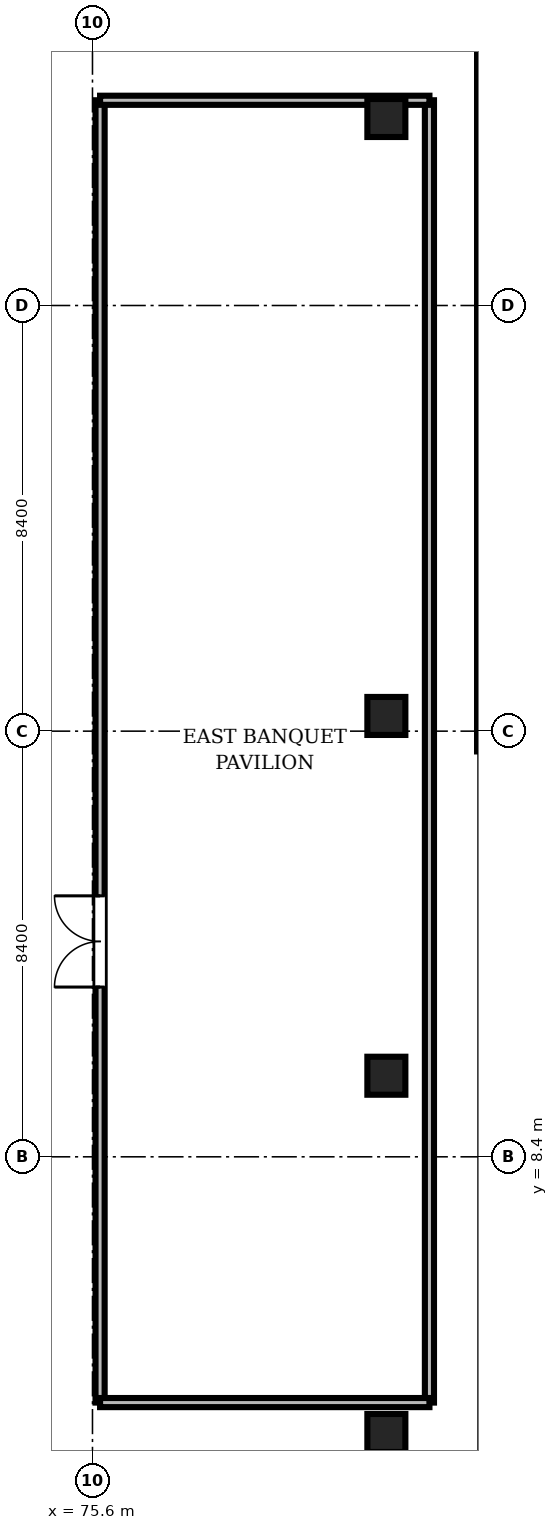
"""IFC4 building model, lengths in metres.
Left out: names, types, materials, properties, quantities, classifications, styles, units other than length and angle.
Written with IfcOpenShell. Run it as: python <this file> out.ifc"""

import sys

from ifc_helpers import new_model, si_unit, direction, frame, frame_2d, origin, origin_2d, place, context, subcontext, project, spatial, rectangle, extrude, source, transform, mapped, element, fill, save


model = new_model("IFC4")
c1 = context("Model", 3, precision=1e-05, world=origin(), true_north=direction((0.0, 1.0)))
c2 = subcontext(c1, "Body", "Model", "MODEL_VIEW")
j1 = project(units=[si_unit("LENGTHUNIT", "METRE"), si_unit("PLANEANGLEUNIT", "RADIAN")], contexts=[c1])
p1 = place(None, origin())
s1 = spatial("IfcSite", under=j1, at=p1, CompositionType="ELEMENT")
p2 = place(p1, origin())
s2 = spatial("IfcBuilding", under=s1, at=p2, CompositionType="ELEMENT")
p3 = place(p2, frame((0.0, 0.0, 17.0)))
s3 = spatial("IfcBuildingStorey", under=s2, at=p3, CompositionType="ELEMENT", Elevation=17.0)
m1 = source(origin(), c2, "Body", "SweptSolid", [
    extrude(rectangle(XDim=0.75, YDim=0.75, at=origin_2d()), origin(), (0.0, 0.0, 1.0), 5.08),
])
for number, where, z_axis, x_axis in (
    (1, (81.4, 2.95, 0.0), (0.0, 0.0, 1.0), (1.0, 0.0, 0.0)),
    (2, (81.4, 10.0, 0.0), (0.0, 0.0, 1.0), (1.0, 0.0, 0.0)),
    (3, (81.4, 17.1, 0.0), (0.0, 0.0, 1.0), (1.0, 0.0, 0.0)),
    (4, (81.4, 28.9, 0.0), (0.0, 0.0, 1.0), (1.0, 0.0, 0.0)),
):
    element("IfcColumn", number, at=place(p3, frame(where, z_axis=z_axis, x_axis=x_axis)), inside=s3, PredefinedType="COLUMN", context=c2, shape_type="MappedRepresentation", body=[
        mapped(m1, transform((0.0, 0.0, 0.0), scale=1.0)),
    ])
m2 = source(origin(), c2, "Body", "SweptSolid", [
    extrude(rectangle(XDim=23.4, YDim=0.32, at=frame_2d((11.7, 0.0))), origin(), (0.0, 0.0, 1.0), 5.08),
])
p4 = place(p3, frame((83.35, 16.4, 0.0), z_axis=(0.0, 0.0, 1.0), x_axis=(0.0, 1.0, 0.0)))
e5 = element("IfcWall", 5, at=p4, inside=s3, PredefinedType="SOLIDWALL", context=c2, shape_type="MappedRepresentation", body=[
    mapped(m2, transform((0.0, 0.0, 0.0), scale=1.0)),
])
m3 = source(origin(), c2, "Body", "SweptSolid", [
    extrude(rectangle(XDim=2.6, YDim=2.8, at=frame_2d((1.3, 1.4))), frame((0.0, 0.17, 0.0), z_axis=(0.0, -1.0, 0.0), x_axis=(1.0, 0.0, 0.0)), (0.0, 0.0, 1.0), 0.34),
])
p5 = place(p4, frame((2.4, 0.0, 0.85)))
e6 = element("IfcOpeningElement", 6, at=p5, cuts=e5, PredefinedType="OPENING", context=c2, shape_type="MappedRepresentation", body=[
    mapped(m3, transform((0.0, 0.0, 0.0), scale=1.0)),
])
p6 = place(p4, frame((11.2, 0.0, 0.85)))
e7 = element("IfcOpeningElement", 7, at=p6, cuts=e5, PredefinedType="OPENING", context=c2, shape_type="MappedRepresentation", body=[
    mapped(m3, transform((0.0, 0.0, 0.0), scale=1.0)),
])
m4 = source(origin(), c2, "Body", "SweptSolid", [
    extrude(rectangle(XDim=25.7, YDim=0.18, at=frame_2d((12.85, 0.0))), origin(), (0.0, 0.0, 1.0), 4.548),
])
p7 = place(p3, frame((75.75, 3.55, 0.0), z_axis=(0.0, 0.0, 1.0), x_axis=(0.0, 1.0, 0.0)))
e8 = element("IfcWall", 8, at=p7, inside=s3, PredefinedType="PARTITIONING", context=c2, shape_type="MappedRepresentation", body=[
    mapped(m4, transform((0.0, 0.0, 0.0), scale=1.0)),
])
m5 = source(origin(), c2, "Body", "SweptSolid", [
    extrude(rectangle(XDim=1.8, YDim=2.4, at=frame_2d((0.9, 1.2))), frame((0.0, 0.1, 0.0), z_axis=(0.0, -1.0, 0.0), x_axis=(1.0, 0.0, 0.0)), (0.0, 0.0, 1.0), 0.2),
])
p8 = place(p7, frame((8.2, 0.0, 0.0)))
e9 = element("IfcOpeningElement", 9, at=p8, cuts=e8, PredefinedType="OPENING", context=c2, shape_type="MappedRepresentation", body=[
    mapped(m5, transform((0.0, 0.0, 0.0), scale=1.0)),
])
m6 = source(origin(), c2, "Body", "SweptSolid", [
    extrude(rectangle(XDim=25.7, YDim=0.18, at=frame_2d((12.85, 0.0))), origin(), (0.0, 0.0, 1.0), 5.08),
])
p9 = place(p3, frame((82.25, 3.55, 0.0), z_axis=(0.0, 0.0, 1.0), x_axis=(0.0, 1.0, 0.0)))
e10 = element("IfcWall", 10, at=p9, inside=s3, PredefinedType="PARTITIONING", context=c2, shape_type="MappedRepresentation", body=[
    mapped(m6, transform((0.0, 0.0, 0.0), scale=1.0)),
])
m7 = source(origin(), c2, "Body", "SweptSolid", [
    extrude(rectangle(XDim=6.5, YDim=0.18, at=frame_2d((3.25, 0.0))), origin(), (0.0, 0.0, 1.0), 4.472),
])
for number, where, z_axis, x_axis in (
    (11, (75.75, 3.55, 0.0), (0.0, 0.0, 1.0), (1.0, 0.0, 0.0)),
    (12, (75.75, 29.25, 0.0), (0.0, 0.0, 1.0), (1.0, 0.0, 0.0)),
):
    element("IfcWall", number, at=place(p3, frame(where, z_axis=z_axis, x_axis=x_axis)), inside=s3, PredefinedType="PARTITIONING", context=c2, shape_type="MappedRepresentation", body=[
        mapped(m7, transform((0.0, 0.0, 0.0), scale=1.0)),
    ])
m8 = source(origin(), c2, "Body", "SweptSolid", [
    extrude(rectangle(XDim=1.8, YDim=2.4, at=frame_2d((0.9, 1.2))), frame((0.0, 0.025, 0.0), z_axis=(0.0, -1.0, 0.0), x_axis=(1.0, 0.0, 0.0)), (0.0, 0.0, 1.0), 0.05),
])
p10 = place(p8, origin())
e13 = element("IfcDoor", 13, at=p10, inside=s3, OperationType="DOUBLE_DOOR_SINGLE_SWING", PredefinedType="DOOR", context=c2, shape_type="MappedRepresentation", body=[
    mapped(m8, transform((0.0, 0.0, 0.0), scale=1.0)),
])
fill(e9, e13)
save(model, sys.argv[1])
